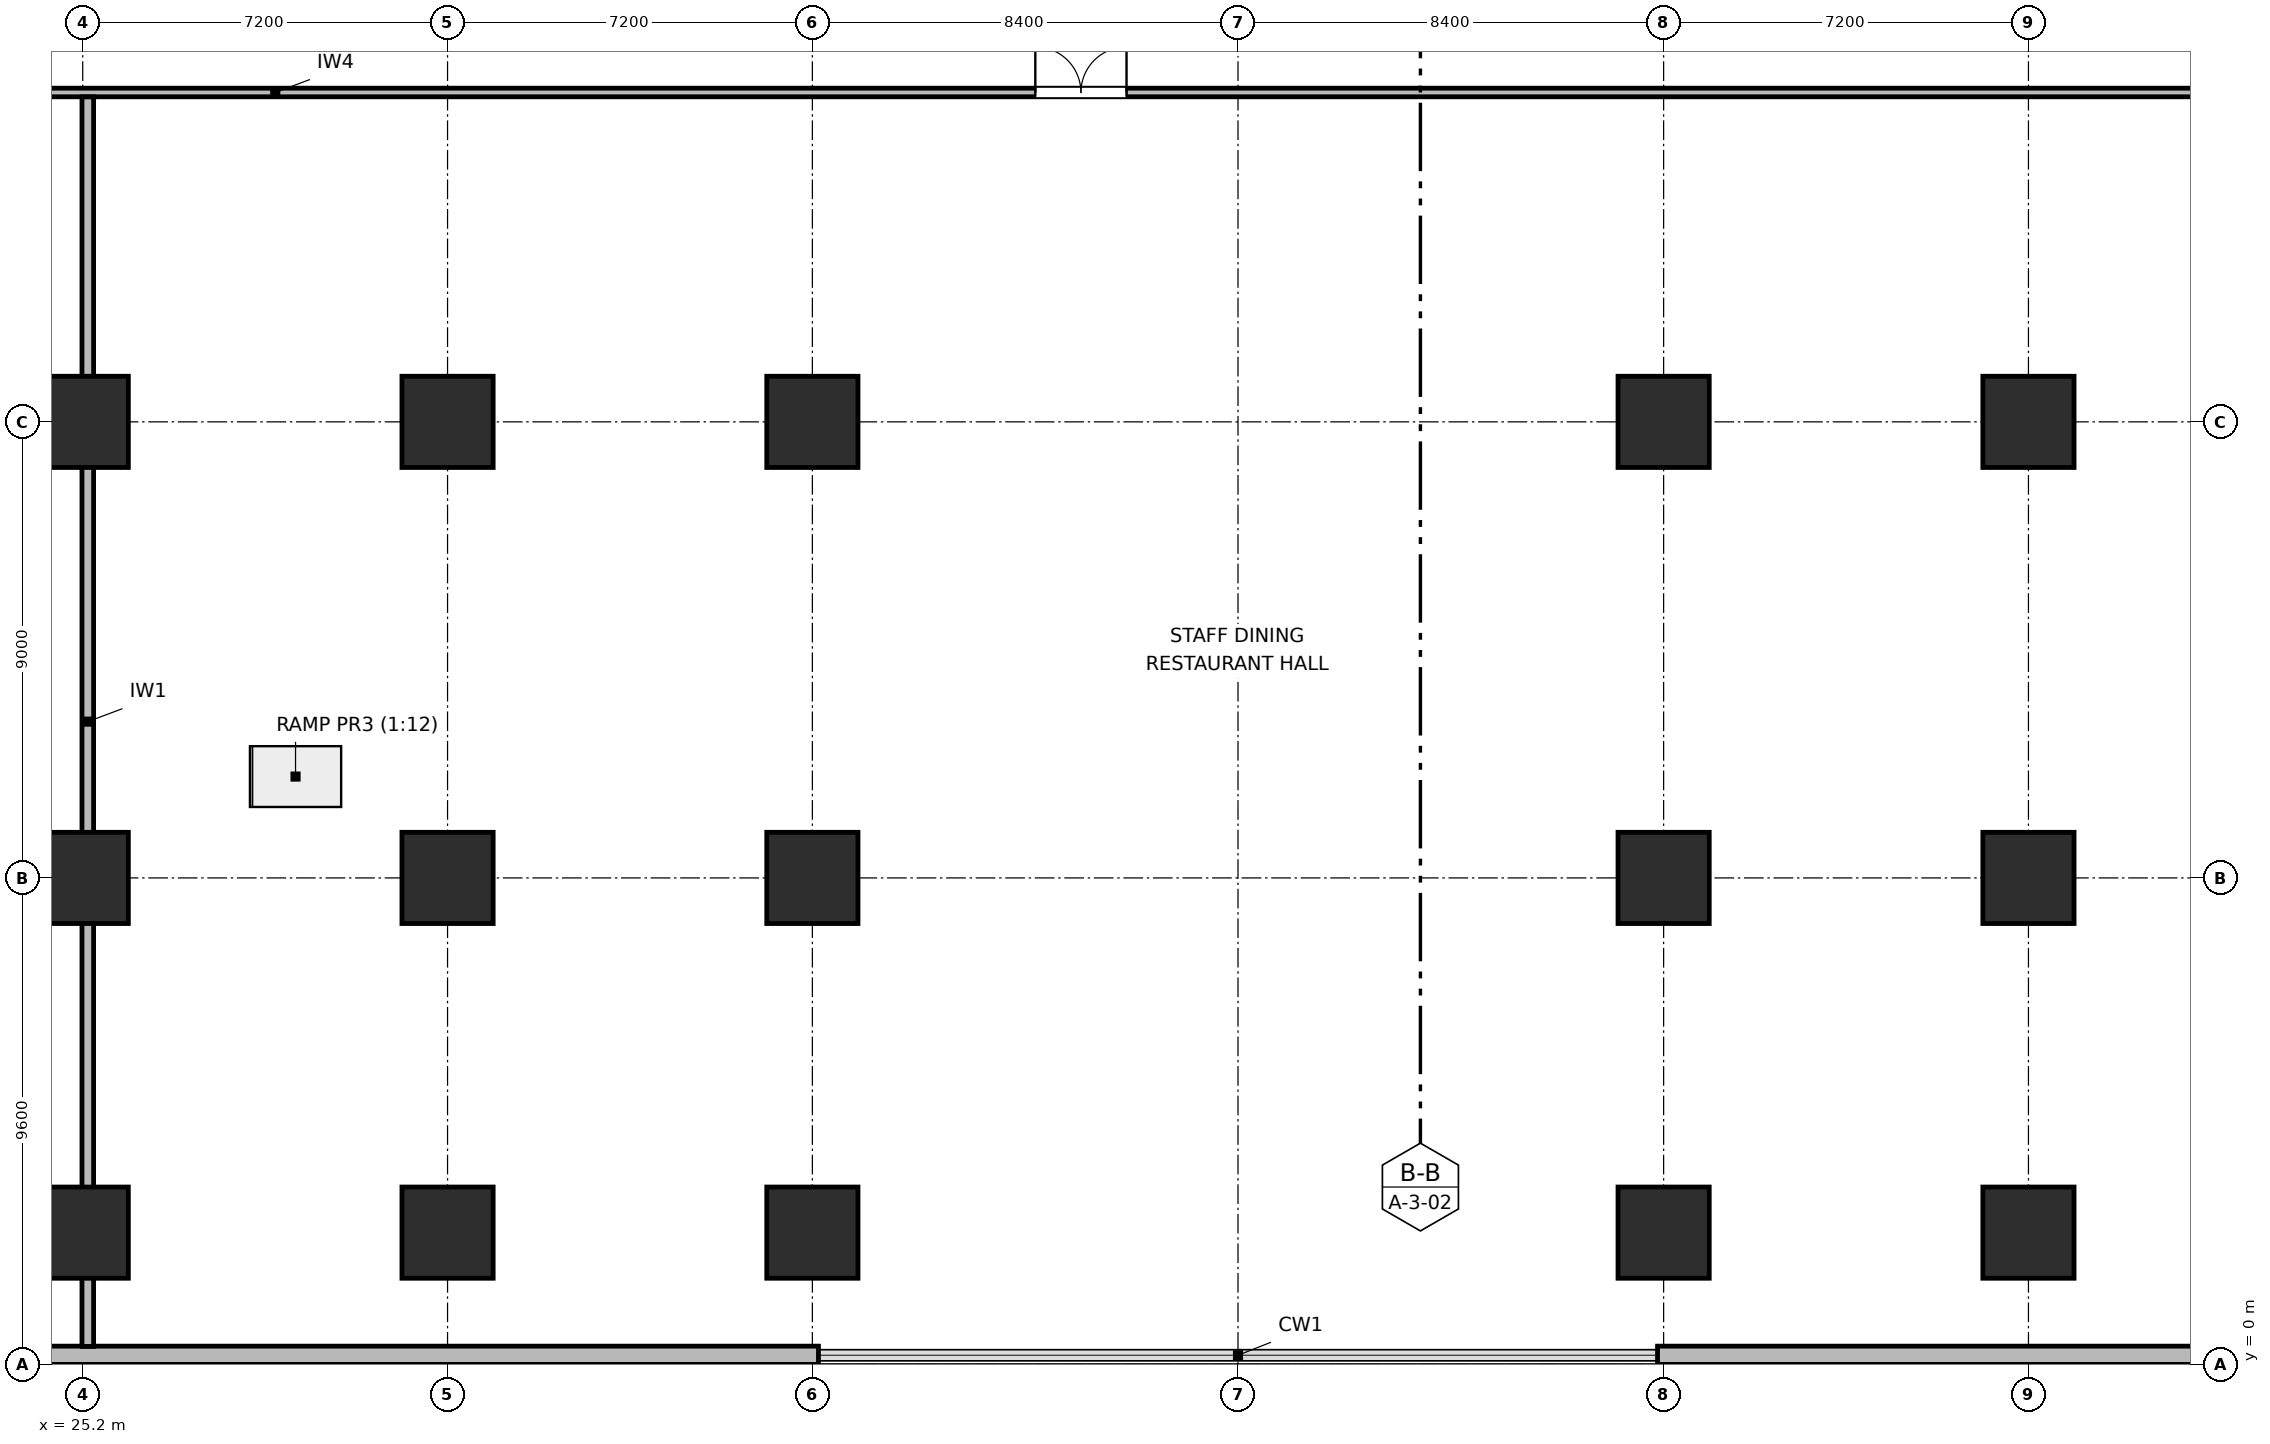
"""IFC4 building model, lengths in metres.
Left out: names, types, materials, properties, quantities, classifications, styles, units other than length and angle.
Written with IfcOpenShell. Run it as: python <this file> out.ifc"""

import sys

from ifc_helpers import new_model, si_unit, direction, frame, frame_2d, origin, origin_2d, place, context, subcontext, project, spatial, rectangle, extrude, element, fill, save


model = new_model("IFC4")
c1 = context("Model", 3, precision=1e-05, world=origin(), true_north=direction((0.0, 1.0)))
c2 = subcontext(c1, "Body", "Model", "MODEL_VIEW")
j1 = project(units=[si_unit("LENGTHUNIT", "METRE"), si_unit("PLANEANGLEUNIT", "RADIAN")], contexts=[c1])
p1 = place(None, origin())
s1 = spatial("IfcSite", under=j1, at=p1, CompositionType="ELEMENT")
p2 = place(p1, origin())
s2 = spatial("IfcBuilding", under=s1, at=p2, CompositionType="ELEMENT")
p3 = place(p2, frame((0.0, 0.0, 8.7)))
s3 = spatial("IfcBuildingStorey", under=s2, at=p3, CompositionType="ELEMENT", Elevation=8.7)
for number, where, z_axis, x_axis in (
    (1, (25.2, 2.6, 0.0), (0.0, 0.0, 1.0), (1.0, 0.0, 0.0)),
    (2, (25.2, 9.6, 0.0), (0.0, 0.0, 1.0), (1.0, 0.0, 0.0)),
    (3, (25.2, 18.6, 0.0), (0.0, 0.0, 1.0), (1.0, 0.0, 0.0)),
    (4, (32.4, 2.6, 0.0), (0.0, 0.0, 1.0), (1.0, 0.0, 0.0)),
    (5, (32.4, 9.6, 0.0), (0.0, 0.0, 1.0), (1.0, 0.0, 0.0)),
    (6, (32.4, 18.6, 0.0), (0.0, 0.0, 1.0), (1.0, 0.0, 0.0)),
    (7, (39.6, 2.6, 0.0), (0.0, 0.0, 1.0), (1.0, 0.0, 0.0)),
    (8, (39.6, 9.6, 0.0), (0.0, 0.0, 1.0), (1.0, 0.0, 0.0)),
    (9, (39.6, 18.6, 0.0), (0.0, 0.0, 1.0), (1.0, 0.0, 0.0)),
    (10, (56.4, 2.6, 0.0), (0.0, 0.0, 1.0), (1.0, 0.0, 0.0)),
    (11, (56.4, 9.6, 0.0), (0.0, 0.0, 1.0), (1.0, 0.0, 0.0)),
    (12, (56.4, 18.6, 0.0), (0.0, 0.0, 1.0), (1.0, 0.0, 0.0)),
    (13, (63.6, 2.6, 0.0), (0.0, 0.0, 1.0), (1.0, 0.0, 0.0)),
    (14, (63.6, 9.6, 0.0), (0.0, 0.0, 1.0), (1.0, 0.0, 0.0)),
    (15, (63.6, 18.6, 0.0), (0.0, 0.0, 1.0), (1.0, 0.0, 0.0)),
):
    element("IfcColumn", number, at=place(p3, frame(where, z_axis=z_axis, x_axis=x_axis)), inside=s3, PredefinedType="COLUMN", context=c2, shape_type="SweptSolid", body=[
        extrude(rectangle(XDim=1.8, YDim=1.8, at=origin_2d()), origin(), (0.0, 0.0, 1.0), 4.2),
    ])
for number, where, z_axis, x_axis in (
    (16, (96.0, 0.18, 0.0), (0.0, 0.0, 1.0), (-1.0, 0.0, 0.0)),
    (17, (39.72, 0.18, 0.0), (0.0, 0.0, 1.0), (-1.0, 0.0, 0.0)),
):
    element("IfcWall", number, at=place(p3, frame(where, z_axis=z_axis, x_axis=x_axis)), inside=s3, PredefinedType="SOLIDWALL", context=c2, shape_type="SweptSolid", body=[
        extrude(rectangle(XDim=39.72, YDim=0.36, at=frame_2d((19.86, 0.0))), origin(), (0.0, 0.0, 1.0), 3.88),
    ])
p4 = place(p3, frame((10.0, 25.1, 0.0), z_axis=(0.0, 0.0, 1.0), x_axis=(1.0, 0.0, 0.0)))
e18 = element("IfcWall", 18, at=p4, inside=s3, PredefinedType="PARTITIONING", context=c2, shape_type="SweptSolid", body=[
    extrude(rectangle(XDim=76.0, YDim=0.17, at=frame_2d((38.0, 0.0))), origin(), (0.0, 0.0, 1.0), 3.88),
])
p5 = place(p4, frame((2.2, 0.0, 0.0)))
e19 = element("IfcOpeningElement", 19, at=p5, cuts=e18, PredefinedType="OPENING", context=c2, shape_type="SweptSolid", body=[
    extrude(rectangle(XDim=1.8, YDim=2.06, at=frame_2d((0.9, 1.03))), frame((0.0, 0.095, 0.0), z_axis=(0.0, -1.0, 0.0), x_axis=(1.0, 0.0, 0.0)), (0.0, 0.0, 1.0), 0.19),
])
p6 = place(p4, frame((34.0, 0.0, 0.0)))
e20 = element("IfcOpeningElement", 20, at=p6, cuts=e18, PredefinedType="OPENING", context=c2, shape_type="SweptSolid", body=[
    extrude(rectangle(XDim=1.8, YDim=2.06, at=frame_2d((0.9, 1.03))), frame((0.0, 0.095, 0.0), z_axis=(0.0, -1.0, 0.0), x_axis=(1.0, 0.0, 0.0)), (0.0, 0.0, 1.0), 0.19),
])
p7 = place(p4, frame((64.0, 0.0, 0.0)))
e21 = element("IfcOpeningElement", 21, at=p7, cuts=e18, PredefinedType="OPENING", context=c2, shape_type="SweptSolid", body=[
    extrude(rectangle(XDim=1.1, YDim=2.05, at=frame_2d((0.55, 1.025))), frame((0.0, 0.095, 0.0), z_axis=(0.0, -1.0, 0.0), x_axis=(1.0, 0.0, 0.0)), (0.0, 0.0, 1.0), 0.19),
])
p8 = place(p3, frame((25.3, 0.355, 0.0), z_axis=(0.0, 0.0, 1.0), x_axis=(0.0, 1.0, 0.0)))
e22 = element("IfcWall", 22, at=p8, inside=s3, PredefinedType="PARTITIONING", context=c2, shape_type="SweptSolid", body=[
    extrude(rectangle(XDim=24.658, YDim=0.23, at=frame_2d((12.329, 0.0))), origin(), (0.0, 0.0, 1.0), 3.092),
])
p9 = place(p6, origin())
e23 = element("IfcDoor", 23, at=p9, inside=s3, OperationType="DOUBLE_DOOR_SINGLE_SWING", PredefinedType="DOOR", context=c2, shape_type="SweptSolid", body=[
    extrude(rectangle(XDim=1.8, YDim=2.06, at=frame_2d((0.9, 1.03))), frame((0.0, 0.025, 0.0), z_axis=(0.0, -1.0, 0.0), x_axis=(1.0, 0.0, 0.0)), (0.0, 0.0, 1.0), 0.05),
])
fill(e20, e23)
save(model, sys.argv[1])
